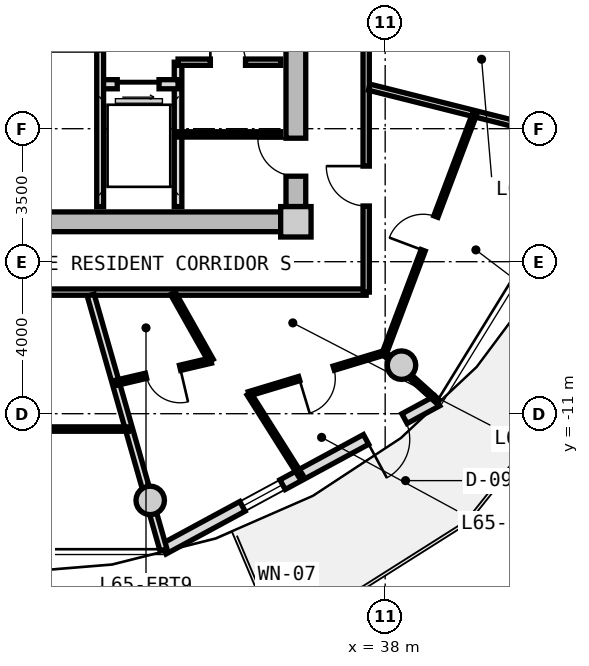
"""IFC4 building model, lengths in metres.
Left out: names, types, materials, properties, quantities, classifications, styles, units other than length and angle.
Written with IfcOpenShell. Run it as: python <this file> out.ifc"""

import sys

from ifc_helpers import new_model, si_unit, direction, frame, frame_2d, origin, origin_2d, place, context, subcontext, project, spatial, rectangle, circle, extrude, source, transform, mapped, element, fill, save


model = new_model("IFC4")
c1 = context("Model", 3, precision=1e-05, world=origin(), true_north=direction((0.0, 1.0)))
c2 = subcontext(c1, "Body", "Model", "MODEL_VIEW")
j1 = project(units=[si_unit("LENGTHUNIT", "METRE"), si_unit("PLANEANGLEUNIT", "RADIAN")], contexts=[c1])
p1 = place(None, origin())
s1 = spatial("IfcSite", under=j1, at=p1, CompositionType="ELEMENT")
p2 = place(p1, origin())
s2 = spatial("IfcBuilding", under=s1, at=p2, CompositionType="ELEMENT")
p3 = place(p2, frame((0.0, 0.0, 210.85)))
s3 = spatial("IfcBuildingStorey", under=s2, at=p3, CompositionType="ELEMENT", Elevation=210.85)
m1 = source(origin(), c2, "Body", "SweptSolid", [
    extrude(rectangle(XDim=0.8, YDim=0.8, at=origin_2d()), origin(), (0.0, 0.0, 1.0), 3.05),
])
p4 = place(p3, frame((35.65, -5.95, 0.0), z_axis=(0.0, 0.0, 1.0), x_axis=(1.0, 0.0, 0.0)))
e1 = element("IfcColumn", 1, at=p4, inside=s3, PredefinedType="COLUMN", context=c2, shape_type="MappedRepresentation", body=[
    mapped(m1, transform((0.0, 0.0, 0.0), x_axis=(1.0, 0.0, 0.0), y_axis=(0.0, 1.0, 0.0), z_axis=(0.0, 0.0, 1.0), scale=1.0)),
])
m2 = source(origin(), c2, "Body", "SweptSolid", [
    extrude(rectangle(XDim=14.5, YDim=0.52, at=frame_2d((7.25, 0.0))), origin(), (0.0, 0.0, 1.0), 2.76),
])
p5 = place(p3, frame((35.25, -5.95, 0.0), z_axis=(0.0, 0.0, 1.0), x_axis=(-1.0, 0.0, 0.0)))
e2 = element("IfcWall", 2, at=p5, inside=s3, PredefinedType="SHEAR", context=c2, shape_type="MappedRepresentation", body=[
    mapped(m2, transform((0.0, 0.0, 0.0), x_axis=(1.0, 0.0, 0.0), y_axis=(0.0, 1.0, 0.0), z_axis=(0.0, 0.0, 1.0), scale=1.0)),
])
m3 = source(origin(), c2, "Body", "SweptSolid", [
    extrude(rectangle(XDim=11.1, YDim=0.52, at=frame_2d((5.55, 0.0))), origin(), (0.0, 0.0, 1.0), 2.76),
])
p6 = place(p3, frame((35.65, 5.55, 0.0), z_axis=(0.0, 0.0, 1.0), x_axis=(0.0, -1.0, 0.0)))
e3 = element("IfcWall", 3, at=p6, inside=s3, PredefinedType="SHEAR", context=c2, shape_type="MappedRepresentation", body=[
    mapped(m3, transform((0.0, 0.0, 0.0), x_axis=(1.0, 0.0, 0.0), y_axis=(0.0, 1.0, 0.0), z_axis=(0.0, 0.0, 1.0), scale=1.0)),
])
p7 = place(p6, frame((5.65, 0.0, 0.0)))
e4 = element("IfcOpeningElement", 4, at=p7, cuts=e3, PredefinedType="OPENING", context=c2, shape_type="SweptSolid", body=[
    extrude(rectangle(XDim=1.2, YDim=2.15, at=frame_2d((0.6, 1.075))), frame((0.0, 0.27, 0.0), z_axis=(0.0, -1.0, 0.0), x_axis=(1.0, 0.0, 0.0)), (0.0, 0.0, 1.0), 0.54),
])
p8 = place(p6, frame((9.3, 0.0, 0.0)))
e5 = element("IfcOpeningElement", 5, at=p8, cuts=e3, PredefinedType="OPENING", context=c2, shape_type="SweptSolid", body=[
    extrude(rectangle(XDim=1.0, YDim=2.1, at=frame_2d((0.5, 1.05))), frame((0.0, 0.27, 0.0), z_axis=(0.0, -1.0, 0.0), x_axis=(1.0, 0.0, 0.0)), (0.0, 0.0, 1.0), 0.54),
])
m4 = source(origin(), c2, "Body", "SweptSolid", [
    extrude(circle(Radius=0.375, at=origin_2d()), origin(), (0.0, 0.0, 1.0), 3.05),
])
for number, where, z_axis, x_axis in (
    (6, (31.818, -13.281, 0.0), (0.0, 0.0, 1.0), (1.0, 0.0, 0.0)),
    (7, (38.43, -9.723, 0.0), (0.0, 0.0, 1.0), (1.0, 0.0, 0.0)),
):
    element("IfcColumn", number, at=place(p3, frame(where, z_axis=z_axis, x_axis=x_axis)), inside=s3, PredefinedType="COLUMN", context=c2, shape_type="MappedRepresentation", body=[
        mapped(m4, transform((0.0, 0.0, 0.0), x_axis=(1.0, 0.0, 0.0), y_axis=(0.0, 1.0, 0.0), z_axis=(0.0, 0.0, 1.0), scale=1.0)),
    ])
m5 = source(origin(), c2, "Body", "SweptSolid", [
    extrude(rectangle(XDim=8.197, YDim=0.29, at=frame_2d((4.099, 0.0))), origin(), (0.0, 0.0, 1.0), 2.76),
])
p9 = place(p3, frame((39.37, -10.663, 0.0), z_axis=(0.0, 0.0, 1.0), x_axis=(-0.879369910001, -0.476139224791, 0.0)))
e8 = element("IfcWall", 8, at=p9, inside=s3, PredefinedType="SOLIDWALL", context=c2, shape_type="MappedRepresentation", body=[
    mapped(m5, transform((0.0, 0.0, 0.0), x_axis=(1.0, 0.0, 0.0), y_axis=(0.0, 1.0, 0.0), z_axis=(0.0, 0.0, 1.0), scale=1.0)),
])
p10 = place(p9, frame((0.98, 0.0, 0.0)))
e9 = element("IfcOpeningElement", 9, at=p10, cuts=e8, PredefinedType="OPENING", context=c2, shape_type="SweptSolid", body=[
    extrude(rectangle(XDim=1.15, YDim=2.25, at=frame_2d((0.575, 1.125))), frame((0.0, 0.155, 0.0), z_axis=(0.0, -1.0, 0.0), x_axis=(1.0, 0.0, 0.0)), (0.0, 0.0, 1.0), 0.31),
])
p11 = place(p9, frame((4.629, 0.0, 0.85)))
e10 = element("IfcOpeningElement", 10, at=p11, cuts=e8, PredefinedType="OPENING", context=c2, shape_type="SweptSolid", body=[
    extrude(rectangle(XDim=1.2, YDim=1.5, at=frame_2d((0.6, 0.75))), frame((0.0, 0.155, 0.0), z_axis=(0.0, -1.0, 0.0), x_axis=(1.0, 0.0, 0.0)), (0.0, 0.0, 1.0), 0.31),
])
m6 = source(origin(), c2, "Body", "SweptSolid", [
    extrude(rectangle(XDim=3.8, YDim=0.2, at=frame_2d((1.9, 0.0))), origin(), (0.0, 0.0, 1.0), 2.745),
])
p12 = place(p3, frame((32.55, -5.55, 0.0), z_axis=(0.0, 0.0, 1.0), x_axis=(0.0, 1.0, 0.0)))
e11 = element("IfcWall", 11, at=p12, inside=s3, PredefinedType="PARTITIONING", context=c2, shape_type="MappedRepresentation", body=[
    mapped(m6, transform((0.0, 0.0, 0.0), x_axis=(1.0, 0.0, 0.0), y_axis=(0.0, 1.0, 0.0), z_axis=(0.0, 0.0, 1.0), scale=1.0)),
])
m7 = source(origin(), c2, "Body", "SweptSolid", [
    extrude(rectangle(XDim=2.05, YDim=0.24, at=frame_2d((1.025, 0.0))), origin(), (0.0, 0.0, 1.0), 2.745),
])
p13 = place(p3, frame((30.5, -2.33, 0.0), z_axis=(0.0, 0.0, 1.0), x_axis=(1.0, 0.0, 0.0)))
e12 = element("IfcWall", 12, at=p13, inside=s3, PredefinedType="PARTITIONING", context=c2, shape_type="MappedRepresentation", body=[
    mapped(m7, transform((0.0, 0.0, 0.0), x_axis=(1.0, 0.0, 0.0), y_axis=(0.0, 1.0, 0.0), z_axis=(0.0, 0.0, 1.0), scale=1.0)),
])
p14 = place(p13, frame((0.45, 0.0, 0.0)))
e13 = element("IfcOpeningElement", 13, at=p14, cuts=e12, PredefinedType="OPENING", context=c2, shape_type="SweptSolid", body=[
    extrude(rectangle(XDim=1.1, YDim=2.2, at=frame_2d((0.55, 1.1))), frame((0.0, 0.13, 0.0), z_axis=(0.0, -1.0, 0.0), x_axis=(1.0, 0.0, 0.0)), (0.0, 0.0, 1.0), 0.26),
])
m8 = source(origin(), c2, "Body", "SweptSolid", [
    extrude(rectangle(XDim=4.2, YDim=0.18, at=frame_2d((2.1, 0.0))), origin(), (0.0, 0.0, 1.0), 2.745),
])
p15 = place(p3, frame((30.5, -5.55, 0.0), z_axis=(0.0, 0.0, 1.0), x_axis=(0.0, 1.0, 0.0)))
e14 = element("IfcWall", 14, at=p15, inside=s3, PredefinedType="PARTITIONING", context=c2, shape_type="MappedRepresentation", body=[
    mapped(m8, transform((0.0, 0.0, 0.0), x_axis=(1.0, 0.0, 0.0), y_axis=(0.0, 1.0, 0.0), z_axis=(0.0, 0.0, 1.0), scale=1.0)),
])
m9 = source(origin(), c2, "Body", "SweptSolid", [
    extrude(rectangle(XDim=2.7, YDim=0.165, at=frame_2d((1.35, 0.0))), origin(), (0.0, 0.0, 1.0), 2.745),
])
p16 = place(p3, frame((32.55, -1.75, 0.0), z_axis=(0.0, 0.0, 1.0), x_axis=(1.0, 0.0, 0.0)))
e15 = element("IfcWall", 15, at=p16, inside=s3, PredefinedType="PARTITIONING", context=c2, shape_type="MappedRepresentation", body=[
    mapped(m9, transform((0.0, 0.0, 0.0), x_axis=(1.0, 0.0, 0.0), y_axis=(0.0, 1.0, 0.0), z_axis=(0.0, 0.0, 1.0), scale=1.0)),
])
p17 = place(p16, frame((0.85, 0.0, 0.0)))
e16 = element("IfcOpeningElement", 16, at=p17, cuts=e15, PredefinedType="OPENING", context=c2, shape_type="SweptSolid", body=[
    extrude(rectangle(XDim=0.925, YDim=2.1, at=frame_2d((0.462, 1.05))), frame((0.0, 0.093, 0.0), z_axis=(0.0, -1.0, 0.0), x_axis=(1.0, 0.0, 0.0)), (0.0, 0.0, 1.0), 0.185),
])
m10 = source(origin(), c2, "Body", "SweptSolid", [
    extrude(rectangle(XDim=2.7, YDim=0.14, at=frame_2d((1.35, 0.0))), origin(), (0.0, 0.0, 1.0), 2.745),
])
p18 = place(p3, frame((32.55, -3.65, 0.0), z_axis=(0.0, 0.0, 1.0), x_axis=(1.0, 0.0, 0.0)))
e17 = element("IfcWall", 17, at=p18, inside=s3, PredefinedType="PARTITIONING", context=c2, shape_type="MappedRepresentation", body=[
    mapped(m10, transform((0.0, 0.0, 0.0), x_axis=(1.0, 0.0, 0.0), y_axis=(0.0, 1.0, 0.0), z_axis=(0.0, 0.0, 1.0), scale=1.0)),
])
m11 = source(origin(), c2, "Body", "SweptSolid", [
    extrude(rectangle(XDim=19.0, YDim=0.165, at=frame_2d((9.5, 0.0))), origin(), (0.0, 0.0, 1.0), 2.745),
])
p19 = place(p3, frame((37.5, -7.8, 0.0), z_axis=(0.0, 0.0, 1.0), x_axis=(-1.0, 0.0, 0.0)))
e18 = element("IfcWall", 18, at=p19, inside=s3, PredefinedType="PARTITIONING", context=c2, shape_type="MappedRepresentation", body=[
    mapped(m11, transform((0.0, 0.0, 0.0), x_axis=(1.0, 0.0, 0.0), y_axis=(0.0, 1.0, 0.0), z_axis=(0.0, 0.0, 1.0), scale=1.0)),
])
p20 = place(p19, frame((12.473, 0.0, 0.0)))
e19 = element("IfcOpeningElement", 19, at=p20, cuts=e18, PredefinedType="OPENING", context=c2, shape_type="SweptSolid", body=[
    extrude(rectangle(XDim=1.05, YDim=2.15, at=frame_2d((0.525, 1.075))), frame((0.0, 0.093, 0.0), z_axis=(0.0, -1.0, 0.0), x_axis=(1.0, 0.0, 0.0)), (0.0, 0.0, 1.0), 0.185),
])
m12 = source(origin(), c2, "Body", "SweptSolid", [
    extrude(rectangle(XDim=6.88, YDim=0.165, at=frame_2d((3.44, 0.0))), origin(), (0.0, 0.0, 1.0), 2.745),
])
p21 = place(p3, frame((37.5, -0.92, 0.0), z_axis=(0.0, 0.0, 1.0), x_axis=(0.0, -1.0, 0.0)))
e20 = element("IfcWall", 20, at=p21, inside=s3, PredefinedType="PARTITIONING", context=c2, shape_type="MappedRepresentation", body=[
    mapped(m12, transform((0.0, 0.0, 0.0), x_axis=(1.0, 0.0, 0.0), y_axis=(0.0, 1.0, 0.0), z_axis=(0.0, 0.0, 1.0), scale=1.0)),
])
p22 = place(p21, frame((3.564, 0.0, 0.0)))
e21 = element("IfcOpeningElement", 21, at=p22, cuts=e20, PredefinedType="OPENING", context=c2, shape_type="SweptSolid", body=[
    extrude(rectangle(XDim=1.05, YDim=2.15, at=frame_2d((0.525, 1.075))), frame((0.0, 0.093, 0.0), z_axis=(0.0, -1.0, 0.0), x_axis=(1.0, 0.0, 0.0)), (0.0, 0.0, 1.0), 0.185),
])
m13 = source(origin(), c2, "Body", "SweptSolid", [
    extrude(rectangle(XDim=6.157, YDim=0.165, at=frame_2d((3.079, 0.0))), origin(), (0.0, 0.0, 1.0), 2.345),
])
p23 = place(p3, frame((37.58, -2.407, 0.0), z_axis=(0.0, 0.0, 1.0), x_axis=(0.969840867184, -0.243738984038, 0.0)))
e22 = element("IfcWall", 22, at=p23, inside=s3, PredefinedType="PARTITIONING", context=c2, shape_type="MappedRepresentation", body=[
    mapped(m13, transform((0.0, 0.0, 0.0), x_axis=(1.0, 0.0, 0.0), y_axis=(0.0, 1.0, 0.0), z_axis=(0.0, 0.0, 1.0), scale=1.0)),
])
m14 = source(origin(), c2, "Body", "SweptSolid", [
    extrude(rectangle(XDim=6.974, YDim=0.19, at=frame_2d((3.487, 0.0))), origin(), (0.0, 0.0, 1.0), 2.345),
])
p24 = place(p3, frame((30.251, -7.88, 0.0), z_axis=(0.0, 0.0, 1.0), x_axis=(0.274707256801, -0.961527910703, 0.0)))
e23 = element("IfcWall", 23, at=p24, inside=s3, PredefinedType="PARTITIONING", context=c2, shape_type="MappedRepresentation", body=[
    mapped(m14, transform((0.0, 0.0, 0.0), x_axis=(1.0, 0.0, 0.0), y_axis=(0.0, 1.0, 0.0), z_axis=(0.0, 0.0, 1.0), scale=1.0)),
])
m15 = source(origin(), c2, "Body", "SweptSolid", [
    extrude(rectangle(XDim=6.481, YDim=0.115, at=frame_2d((3.24, 0.0))), origin(), (0.0, 0.0, 1.0), 2.745),
])
p25 = place(p3, frame((24.76, -11.404, 0.0), z_axis=(0.0, 0.0, 1.0), x_axis=(1.0, 0.0, 0.0)))
e24 = element("IfcWall", 24, at=p25, inside=s3, PredefinedType="PARTITIONING", context=c2, shape_type="MappedRepresentation", body=[
    mapped(m15, transform((0.0, 0.0, 0.0), x_axis=(1.0, 0.0, 0.0), y_axis=(0.0, 1.0, 0.0), z_axis=(0.0, 0.0, 1.0), scale=1.0)),
])
p26 = place(p25, frame((2.765, 0.0, 0.0)))
e25 = element("IfcOpeningElement", 25, at=p26, cuts=e24, PredefinedType="OPENING", context=c2, shape_type="SweptSolid", body=[
    extrude(rectangle(XDim=0.95, YDim=2.1, at=frame_2d((0.475, 1.05))), frame((0.0, 0.067, 0.0), z_axis=(0.0, -1.0, 0.0), x_axis=(1.0, 0.0, 0.0)), (0.0, 0.0, 1.0), 0.135),
])
m16 = source(origin(), c2, "Body", "SweptSolid", [
    extrude(rectangle(XDim=6.738, YDim=0.115, at=frame_2d((3.369, 0.0))), origin(), (0.0, 0.0, 1.0), 2.745),
])
p27 = place(p3, frame((37.978, -9.409, 0.0), z_axis=(0.0, 0.0, 1.0), x_axis=(0.352945344347, 0.935643940772, 0.0)))
e26 = element("IfcWall", 26, at=p27, inside=s3, PredefinedType="PARTITIONING", context=c2, shape_type="MappedRepresentation", body=[
    mapped(m16, transform((0.0, 0.0, 0.0), x_axis=(1.0, 0.0, 0.0), y_axis=(0.0, 1.0, 0.0), z_axis=(0.0, 0.0, 1.0), scale=1.0)),
])
p28 = place(p27, frame((2.894, 0.0, 0.0)))
e27 = element("IfcOpeningElement", 27, at=p28, cuts=e26, PredefinedType="OPENING", context=c2, shape_type="SweptSolid", body=[
    extrude(rectangle(XDim=0.95, YDim=2.1, at=frame_2d((0.475, 1.05))), frame((0.0, 0.067, 0.0), z_axis=(0.0, -1.0, 0.0), x_axis=(1.0, 0.0, 0.0)), (0.0, 0.0, 1.0), 0.135),
])
m17 = source(origin(), c2, "Body", "SweptSolid", [
    extrude(rectangle(XDim=1.894, YDim=0.115, at=frame_2d((0.947, 0.0))), origin(), (0.0, 0.0, 1.0), 2.345),
])
p29 = place(p3, frame((37.978, -9.409, 0.0), z_axis=(0.0, 0.0, 1.0), x_axis=(0.742704207382, -0.669619638554, 0.0)))
e28 = element("IfcWall", 28, at=p29, inside=s3, PredefinedType="PARTITIONING", context=c2, shape_type="MappedRepresentation", body=[
    mapped(m17, transform((0.0, 0.0, 0.0), x_axis=(1.0, 0.0, 0.0), y_axis=(0.0, 1.0, 0.0), z_axis=(0.0, 0.0, 1.0), scale=1.0)),
])
m18 = source(origin(), c2, "Body", "SweptSolid", [
    extrude(rectangle(XDim=2.035, YDim=0.14, at=frame_2d((1.018, 0.0))), origin(), (0.0, 0.0, 1.0), 2.745),
])
p30 = place(p3, frame((32.415, -7.83, 0.0), z_axis=(0.0, 0.0, 1.0), x_axis=(0.491092509169, -0.871107425888, 0.0)))
e29 = element("IfcWall", 29, at=p30, inside=s3, PredefinedType="PARTITIONING", context=c2, shape_type="MappedRepresentation", body=[
    mapped(m18, transform((0.0, 0.0, 0.0), x_axis=(1.0, 0.0, 0.0), y_axis=(0.0, 1.0, 0.0), z_axis=(0.0, 0.0, 1.0), scale=1.0)),
])
m19 = source(origin(), c2, "Body", "SweptSolid", [
    extrude(rectangle(XDim=2.586, YDim=0.14, at=frame_2d((1.293, 0.0))), origin(), (0.0, 0.0, 1.0), 2.745),
])
p31 = place(p3, frame((33.415, -9.603, 0.0), z_axis=(0.0, 0.0, 1.0), x_axis=(-0.973691298219, -0.227871138526, 0.0)))
e30 = element("IfcWall", 30, at=p31, inside=s3, PredefinedType="PARTITIONING", context=c2, shape_type="MappedRepresentation", body=[
    mapped(m19, transform((0.0, 0.0, 0.0), x_axis=(1.0, 0.0, 0.0), y_axis=(0.0, 1.0, 0.0), z_axis=(0.0, 0.0, 1.0), scale=1.0)),
])
p32 = place(p31, frame((0.833, 0.0, 0.0)))
e31 = element("IfcOpeningElement", 31, at=p32, cuts=e30, PredefinedType="OPENING", context=c2, shape_type="SweptSolid", body=[
    extrude(rectangle(XDim=0.92, YDim=2.1, at=frame_2d((0.46, 1.05))), frame((0.0, 0.08, 0.0), z_axis=(0.0, -1.0, 0.0), x_axis=(1.0, 0.0, 0.0)), (0.0, 0.0, 1.0), 0.16),
])
m20 = source(origin(), c2, "Body", "SweptSolid", [
    extrude(rectangle(XDim=2.549, YDim=0.115, at=frame_2d((1.274, 0.0))), origin(), (0.0, 0.0, 1.0), 2.745),
])
p33 = place(p3, frame((34.414, -10.477, 0.0), z_axis=(0.0, 0.0, 1.0), x_axis=(0.534108310175, -0.845416059111, 0.0)))
e32 = element("IfcWall", 32, at=p33, inside=s3, PredefinedType="PARTITIONING", context=c2, shape_type="MappedRepresentation", body=[
    mapped(m20, transform((0.0, 0.0, 0.0), x_axis=(1.0, 0.0, 0.0), y_axis=(0.0, 1.0, 0.0), z_axis=(0.0, 0.0, 1.0), scale=1.0)),
])
m21 = source(origin(), c2, "Body", "SweptSolid", [
    extrude(rectangle(XDim=3.714, YDim=0.115, at=frame_2d((1.857, 0.0))), origin(), (0.0, 0.0, 1.0), 2.745),
])
p34 = place(p3, frame((34.414, -10.477, 0.0), z_axis=(0.0, 0.0, 1.0), x_axis=(0.957188983281, 0.28946372879, 0.0)))
e33 = element("IfcWall", 33, at=p34, inside=s3, PredefinedType="PARTITIONING", context=c2, shape_type="MappedRepresentation", body=[
    mapped(m21, transform((0.0, 0.0, 0.0), x_axis=(1.0, 0.0, 0.0), y_axis=(0.0, 1.0, 0.0), z_axis=(0.0, 0.0, 1.0), scale=1.0)),
])
p35 = place(p34, frame((1.382, 0.0, 0.0)))
e34 = element("IfcOpeningElement", 34, at=p35, cuts=e33, PredefinedType="OPENING", context=c2, shape_type="SweptSolid", body=[
    extrude(rectangle(XDim=0.95, YDim=2.1, at=frame_2d((0.475, 1.05))), frame((0.0, 0.067, 0.0), z_axis=(0.0, -1.0, 0.0), x_axis=(1.0, 0.0, 0.0)), (0.0, 0.0, 1.0), 0.135),
])
m22 = source(origin(), c2, "Body", "SweptSolid", [
    extrude(rectangle(XDim=1.15, YDim=2.25, at=frame_2d((0.575, 1.125))), frame((0.0, 0.025, 0.0), z_axis=(0.0, -1.0, 0.0), x_axis=(1.0, 0.0, 0.0)), (0.0, 0.0, 1.0), 0.05),
])
p36 = place(p10, origin())
e35 = element("IfcDoor", 35, at=p36, inside=s3, OperationType="SINGLE_SWING_RIGHT", PredefinedType="DOOR", context=c2, shape_type="MappedRepresentation", body=[
    mapped(m22, transform((0.0, 0.0, 0.0), x_axis=(1.0, 0.0, 0.0), y_axis=(0.0, 1.0, 0.0), z_axis=(0.0, 0.0, 1.0), scale=1.0)),
])
fill(e9, e35)
m23 = source(origin(), c2, "Body", "SweptSolid", [
    extrude(rectangle(XDim=1.2, YDim=1.5, at=frame_2d((0.6, 0.75))), frame((0.0, 0.03, 0.0), z_axis=(0.0, -1.0, 0.0), x_axis=(1.0, 0.0, 0.0)), (0.0, 0.0, 1.0), 0.06),
])
p37 = place(p11, origin())
e36 = element("IfcWindow", 36, at=p37, inside=s3, PartitioningType="SINGLE_PANEL", PredefinedType="WINDOW", context=c2, shape_type="MappedRepresentation", body=[
    mapped(m23, transform((0.0, 0.0, 0.0), x_axis=(1.0, 0.0, 0.0), y_axis=(0.0, 1.0, 0.0), z_axis=(0.0, 0.0, 1.0), scale=1.0)),
])
fill(e10, e36)
m24 = source(origin(), c2, "Body", "SweptSolid", [
    extrude(rectangle(XDim=1.1, YDim=2.2, at=frame_2d((0.55, 1.1))), frame((0.0, 0.025, 0.0), z_axis=(0.0, -1.0, 0.0), x_axis=(1.0, 0.0, 0.0)), (0.0, 0.0, 1.0), 0.05),
])
p38 = place(p14, frame((1.1, 0.0, 0.0), z_axis=(0.0, 0.0, 1.0), x_axis=(-1.0, 0.0, 0.0)))
e37 = element("IfcDoor", 37, at=p38, inside=s3, OperationType="SLIDING_TO_RIGHT", PredefinedType="DOOR", context=c2, shape_type="MappedRepresentation", body=[
    mapped(m24, transform((0.0, 0.0, 0.0), x_axis=(1.0, 0.0, 0.0), y_axis=(0.0, 1.0, 0.0), z_axis=(0.0, 0.0, 1.0), scale=1.0)),
])
fill(e13, e37)
m25 = source(origin(), c2, "Body", "SweptSolid", [
    extrude(rectangle(XDim=0.925, YDim=2.1, at=frame_2d((0.462, 1.05))), frame((0.0, 0.025, 0.0), z_axis=(0.0, -1.0, 0.0), x_axis=(1.0, 0.0, 0.0)), (0.0, 0.0, 1.0), 0.05),
])
p39 = place(p17, origin())
e38 = element("IfcDoor", 38, at=p39, inside=s3, OperationType="SINGLE_SWING_LEFT", PredefinedType="DOOR", context=c2, shape_type="MappedRepresentation", body=[
    mapped(m25, transform((0.0, 0.0, 0.0), x_axis=(1.0, 0.0, 0.0), y_axis=(0.0, 1.0, 0.0), z_axis=(0.0, 0.0, 1.0), scale=1.0)),
])
fill(e16, e38)
m26 = source(origin(), c2, "Body", "SweptSolid", [
    extrude(rectangle(XDim=1.0, YDim=2.1, at=frame_2d((0.5, 1.05))), frame((0.0, 0.025, 0.0), z_axis=(0.0, -1.0, 0.0), x_axis=(1.0, 0.0, 0.0)), (0.0, 0.0, 1.0), 0.05),
])
p40 = place(p8, frame((1.0, 0.0, 0.0), z_axis=(0.0, 0.0, 1.0), x_axis=(-1.0, 0.0, 0.0)))
e39 = element("IfcDoor", 39, at=p40, inside=s3, OperationType="SINGLE_SWING_RIGHT", PredefinedType="DOOR", context=c2, shape_type="MappedRepresentation", body=[
    mapped(m26, transform((0.0, 0.0, 0.0), x_axis=(1.0, 0.0, 0.0), y_axis=(0.0, 1.0, 0.0), z_axis=(0.0, 0.0, 1.0), scale=1.0)),
])
fill(e5, e39)
m27 = source(origin(), c2, "Body", "SweptSolid", [
    extrude(rectangle(XDim=1.05, YDim=2.15, at=frame_2d((0.525, 1.075))), frame((0.0, 0.025, 0.0), z_axis=(0.0, -1.0, 0.0), x_axis=(1.0, 0.0, 0.0)), (0.0, 0.0, 1.0), 0.05),
])
p41 = place(p22, frame((1.05, 0.0, 0.0), z_axis=(0.0, 0.0, 1.0), x_axis=(-1.0, 0.0, 0.0)))
e40 = element("IfcDoor", 40, at=p41, inside=s3, OperationType="SINGLE_SWING_RIGHT", PredefinedType="DOOR", context=c2, shape_type="MappedRepresentation", body=[
    mapped(m27, transform((0.0, 0.0, 0.0), x_axis=(1.0, 0.0, 0.0), y_axis=(0.0, 1.0, 0.0), z_axis=(0.0, 0.0, 1.0), scale=1.0)),
])
fill(e21, e40)
m28 = source(origin(), c2, "Body", "SweptSolid", [
    extrude(rectangle(XDim=0.92, YDim=2.1, at=frame_2d((0.46, 1.05))), frame((0.0, 0.025, 0.0), z_axis=(0.0, -1.0, 0.0), x_axis=(1.0, 0.0, 0.0)), (0.0, 0.0, 1.0), 0.05),
])
p42 = place(p32, origin())
e41 = element("IfcDoor", 41, at=p42, inside=s3, OperationType="SINGLE_SWING_LEFT", PredefinedType="DOOR", context=c2, shape_type="MappedRepresentation", body=[
    mapped(m28, transform((0.0, 0.0, 0.0), x_axis=(1.0, 0.0, 0.0), y_axis=(0.0, 1.0, 0.0), z_axis=(0.0, 0.0, 1.0), scale=1.0)),
])
fill(e31, e41)
m29 = source(origin(), c2, "Body", "SweptSolid", [
    extrude(rectangle(XDim=0.95, YDim=2.1, at=frame_2d((0.475, 1.05))), frame((0.0, 0.025, 0.0), z_axis=(0.0, -1.0, 0.0), x_axis=(1.0, 0.0, 0.0)), (0.0, 0.0, 1.0), 0.05),
])
p43 = place(p35, frame((0.95, 0.0, 0.0), z_axis=(0.0, 0.0, 1.0), x_axis=(-1.0, 0.0, 0.0)))
e42 = element("IfcDoor", 42, at=p43, inside=s3, OperationType="SINGLE_SWING_RIGHT", PredefinedType="DOOR", context=c2, shape_type="MappedRepresentation", body=[
    mapped(m29, transform((0.0, 0.0, 0.0), x_axis=(1.0, 0.0, 0.0), y_axis=(0.0, 1.0, 0.0), z_axis=(0.0, 0.0, 1.0), scale=1.0)),
])
fill(e34, e42)
p44 = place(p28, origin())
e43 = element("IfcDoor", 43, at=p44, inside=s3, OperationType="SINGLE_SWING_LEFT", PredefinedType="DOOR", context=c2, shape_type="MappedRepresentation", body=[
    mapped(m29, transform((0.0, 0.0, 0.0), x_axis=(1.0, 0.0, 0.0), y_axis=(0.0, 1.0, 0.0), z_axis=(0.0, 0.0, 1.0), scale=1.0)),
])
fill(e27, e43)
save(model, sys.argv[1])
